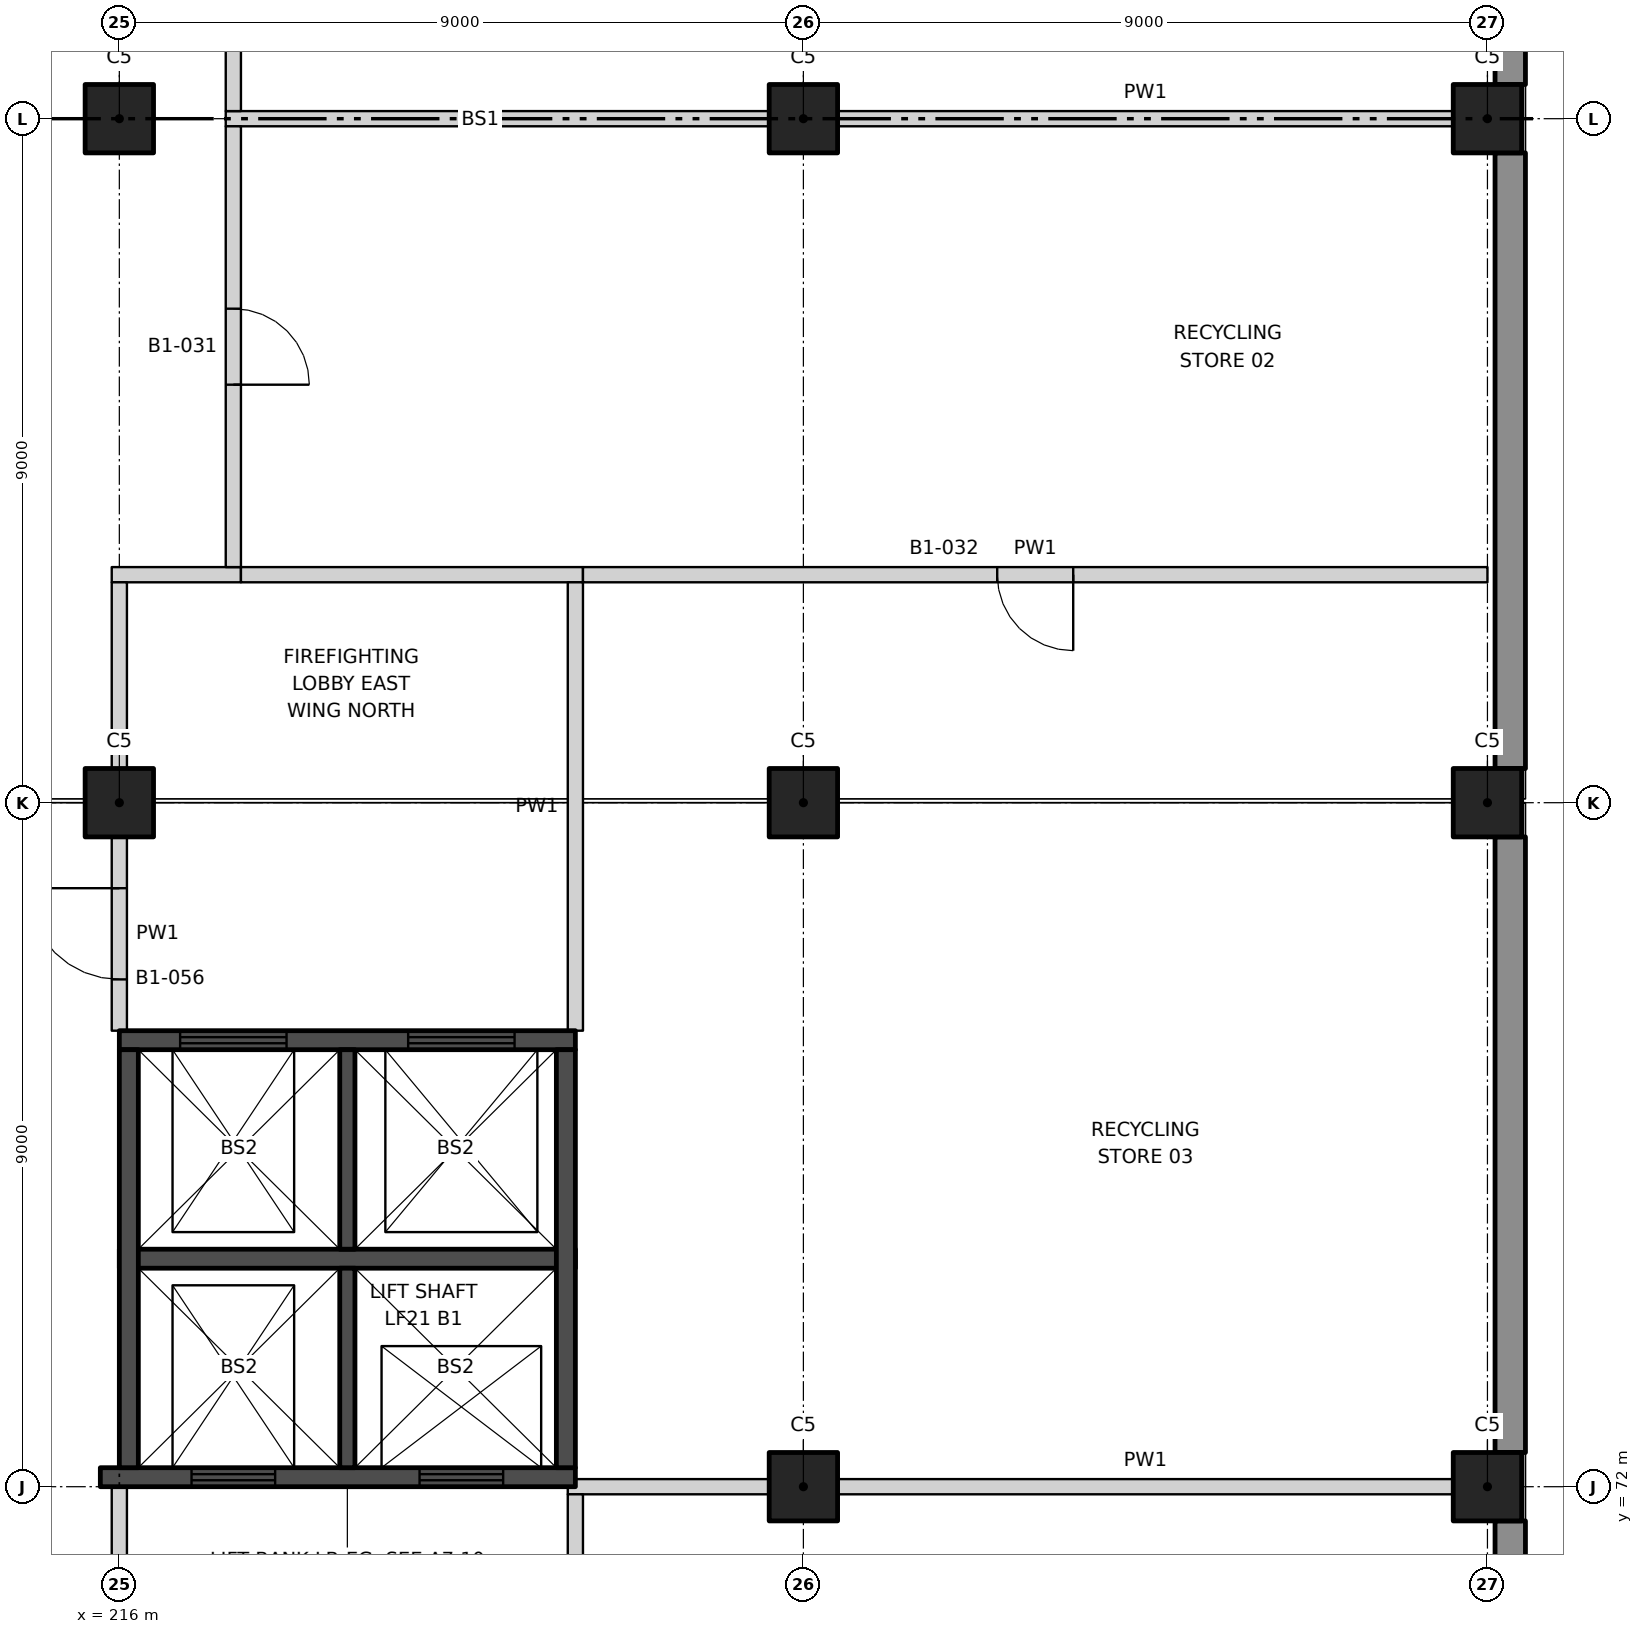
"""IFC4 building model, lengths in metres.
Left out: names, types, materials, properties, quantities, classifications, styles, units other than length and angle.
Written with IfcOpenShell. Run it as: python <this file> out.ifc"""

import sys

from ifc_helpers import new_model, si_unit, direction, frame, frame_2d, origin, origin_2d, place, context, subcontext, project, spatial, rectangle, extrude, element, fill, save


model = new_model("IFC4")
c1 = context("Model", 3, precision=1e-05, world=origin(), true_north=direction((0.0, 1.0)))
c2 = subcontext(c1, "Body", "Model", "MODEL_VIEW")
j1 = project(units=[si_unit("LENGTHUNIT", "METRE"), si_unit("PLANEANGLEUNIT", "RADIAN")], contexts=[c1])
p1 = place(None, origin())
s1 = spatial("IfcSite", under=j1, at=p1, CompositionType="ELEMENT")
p2 = place(p1, origin())
s2 = spatial("IfcBuilding", under=s1, at=p2, CompositionType="ELEMENT")
p3 = place(p2, frame((0.0, 0.0, -6.0)))
s3 = spatial("IfcBuildingStorey", under=s2, at=p3, CompositionType="ELEMENT", Elevation=-6.0)
for number, where, z_axis, x_axis in (
    (1, (216.0, 81.0, 0.0), (0.0, 0.0, 1.0), (1.0, 0.0, 0.0)),
    (2, (216.0, 90.0, 0.0), (0.0, 0.0, 1.0), (1.0, 0.0, 0.0)),
    (3, (225.0, 72.0, 0.0), (0.0, 0.0, 1.0), (1.0, 0.0, 0.0)),
    (4, (225.0, 81.0, 0.0), (0.0, 0.0, 1.0), (1.0, 0.0, 0.0)),
    (5, (225.0, 90.0, 0.0), (0.0, 0.0, 1.0), (1.0, 0.0, 0.0)),
    (6, (234.0, 72.0, 0.0), (0.0, 0.0, 1.0), (1.0, 0.0, 0.0)),
    (7, (234.0, 81.0, 0.0), (0.0, 0.0, 1.0), (1.0, 0.0, 0.0)),
    (8, (234.0, 90.0, 0.0), (0.0, 0.0, 1.0), (1.0, 0.0, 0.0)),
):
    element("IfcColumn", number, at=place(p3, frame(where, z_axis=z_axis, x_axis=x_axis)), inside=s3, PredefinedType="COLUMN", context=c2, shape_type="SweptSolid", body=[
        extrude(rectangle(XDim=0.9, YDim=0.9, at=origin_2d()), origin(), (0.0, 0.0, 1.0), 6.0),
    ])
p4 = place(p3, frame((225.45, 72.0, 0.0), z_axis=(0.0, 0.0, 1.0), x_axis=(1.0, 0.0, 0.0)))
e9 = element("IfcWall", 9, at=p4, inside=s3, PredefinedType="PARTITIONING", context=c2, shape_type="SweptSolid", body=[
    extrude(rectangle(XDim=8.1, YDim=0.2, at=frame_2d((4.05, 0.0))), origin(), (0.0, 0.0, 1.0), 4.65),
])
p5 = place(p3, frame((221.9, 72.0, 0.0), z_axis=(0.0, 0.0, 1.0), x_axis=(1.0, 0.0, 0.0)))
e10 = element("IfcWall", 10, at=p5, inside=s3, PredefinedType="PARTITIONING", context=c2, shape_type="SweptSolid", body=[
    extrude(rectangle(XDim=2.65, YDim=0.2, at=frame_2d((1.325, 0.0))), origin(), (0.0, 0.0, 1.0), 4.85),
])
p6 = place(p3, frame((215.9, 84.0, 0.0), z_axis=(0.0, 0.0, 1.0), x_axis=(1.0, 0.0, 0.0)))
e11 = element("IfcWall", 11, at=p6, inside=s3, PredefinedType="PARTITIONING", context=c2, shape_type="SweptSolid", body=[
    extrude(rectangle(XDim=1.7, YDim=0.2, at=frame_2d((0.85, 0.0))), origin(), (0.0, 0.0, 1.0), 6.0),
])
p7 = place(p3, frame((217.6, 84.0, 0.0), z_axis=(0.0, 0.0, 1.0), x_axis=(1.0, 0.0, 0.0)))
e12 = element("IfcWall", 12, at=p7, inside=s3, PredefinedType="PARTITIONING", context=c2, shape_type="SweptSolid", body=[
    extrude(rectangle(XDim=4.5, YDim=0.2, at=frame_2d((2.25, 0.0))), origin(), (0.0, 0.0, 1.0), 6.0),
])
p8 = place(p3, frame((222.1, 84.0, 0.0), z_axis=(0.0, 0.0, 1.0), x_axis=(1.0, 0.0, 0.0)))
e13 = element("IfcWall", 13, at=p8, inside=s3, PredefinedType="PARTITIONING", context=c2, shape_type="SweptSolid", body=[
    extrude(rectangle(XDim=11.9, YDim=0.2, at=frame_2d((5.95, 0.0))), origin(), (0.0, 0.0, 1.0), 6.0),
])
p9 = place(p8, frame((5.45, 0.0, 0.0)))
e14 = element("IfcOpeningElement", 14, at=p9, cuts=e13, PredefinedType="OPENING", context=c2, shape_type="SweptSolid", body=[
    extrude(rectangle(XDim=1.0, YDim=2.1, at=frame_2d((0.5, 1.05))), frame((0.0, 0.11, 0.0), z_axis=(0.0, -1.0, 0.0), x_axis=(1.0, 0.0, 0.0)), (0.0, 0.0, 1.0), 0.22),
])
p10 = place(p3, frame((225.45, 90.0, 0.0), z_axis=(0.0, 0.0, 1.0), x_axis=(1.0, 0.0, 0.0)))
e15 = element("IfcWall", 15, at=p10, inside=s3, PredefinedType="PARTITIONING", context=c2, shape_type="SweptSolid", body=[
    extrude(rectangle(XDim=8.1, YDim=0.2, at=frame_2d((4.05, 0.0))), origin(), (0.0, 0.0, 1.0), 4.65),
])
p11 = place(p3, frame((217.4, 90.0, 0.0), z_axis=(0.0, 0.0, 1.0), x_axis=(1.0, 0.0, 0.0)))
e16 = element("IfcWall", 16, at=p11, inside=s3, PredefinedType="PARTITIONING", context=c2, shape_type="SweptSolid", body=[
    extrude(rectangle(XDim=7.15, YDim=0.2, at=frame_2d((3.575, 0.0))), origin(), (0.0, 0.0, 1.0), 4.65),
])
p12 = place(p3, frame((216.0, 66.1, 0.0), z_axis=(0.0, 0.0, 1.0), x_axis=(0.0, 1.0, 0.0)))
e17 = element("IfcWall", 17, at=p12, inside=s3, PredefinedType="PARTITIONING", context=c2, shape_type="SweptSolid", body=[
    extrude(rectangle(XDim=5.9, YDim=0.2, at=frame_2d((2.95, 0.0))), origin(), (0.0, 0.0, 1.0), 4.55),
])
p13 = place(p12, frame((2.35, 0.0, 0.0)))
e18 = element("IfcOpeningElement", 18, at=p13, cuts=e17, PredefinedType="OPENING", context=c2, shape_type="SweptSolid", body=[
    extrude(rectangle(XDim=1.2, YDim=2.1, at=frame_2d((0.6, 1.05))), frame((0.0, 0.11, 0.0), z_axis=(0.0, -1.0, 0.0), x_axis=(1.0, 0.0, 0.0)), (0.0, 0.0, 1.0), 0.22),
])
p14 = place(p3, frame((216.0, 78.0, 0.0), z_axis=(0.0, 0.0, 1.0), x_axis=(0.0, 1.0, 0.0)))
e19 = element("IfcWall", 19, at=p14, inside=s3, PredefinedType="PARTITIONING", context=c2, shape_type="SweptSolid", body=[
    extrude(rectangle(XDim=2.55, YDim=0.2, at=frame_2d((1.275, 0.0))), origin(), (0.0, 0.0, 1.0), 4.85),
])
p15 = place(p14, frame((0.675, 0.0, 0.0)))
e20 = element("IfcOpeningElement", 20, at=p15, cuts=e19, PredefinedType="OPENING", context=c2, shape_type="SweptSolid", body=[
    extrude(rectangle(XDim=1.2, YDim=2.1, at=frame_2d((0.6, 1.05))), frame((0.0, 0.11, 0.0), z_axis=(0.0, -1.0, 0.0), x_axis=(1.0, 0.0, 0.0)), (0.0, 0.0, 1.0), 0.22),
])
p16 = place(p3, frame((216.0, 81.45, 0.0), z_axis=(0.0, 0.0, 1.0), x_axis=(0.0, 1.0, 0.0)))
e21 = element("IfcWall", 21, at=p16, inside=s3, PredefinedType="PARTITIONING", context=c2, shape_type="SweptSolid", body=[
    extrude(rectangle(XDim=2.45, YDim=0.2, at=frame_2d((1.225, 0.0))), origin(), (0.0, 0.0, 1.0), 4.65),
])
p17 = place(p3, frame((217.5, 84.1, 0.0), z_axis=(0.0, 0.0, 1.0), x_axis=(0.0, 1.0, 0.0)))
e22 = element("IfcWall", 22, at=p17, inside=s3, PredefinedType="PARTITIONING", context=c2, shape_type="SweptSolid", body=[
    extrude(rectangle(XDim=5.8, YDim=0.2, at=frame_2d((2.9, 0.0))), origin(), (0.0, 0.0, 1.0), 6.0),
])
p18 = place(p17, frame((2.4, 0.0, 0.0)))
e23 = element("IfcOpeningElement", 23, at=p18, cuts=e22, PredefinedType="OPENING", context=c2, shape_type="SweptSolid", body=[
    extrude(rectangle(XDim=1.0, YDim=2.1, at=frame_2d((0.5, 1.05))), frame((0.0, 0.11, 0.0), z_axis=(0.0, -1.0, 0.0), x_axis=(1.0, 0.0, 0.0)), (0.0, 0.0, 1.0), 0.22),
])
p19 = place(p3, frame((217.5, 90.1, 0.0), z_axis=(0.0, 0.0, 1.0), x_axis=(0.0, 1.0, 0.0)))
e24 = element("IfcWall", 24, at=p19, inside=s3, PredefinedType="PARTITIONING", context=c2, shape_type="SweptSolid", body=[
    extrude(rectangle(XDim=17.8, YDim=0.2, at=frame_2d((8.9, 0.0))), origin(), (0.0, 0.0, 1.0), 6.0),
])
p20 = place(p19, frame((3.5, 0.0, 0.0)))
e25 = element("IfcOpeningElement", 25, at=p20, cuts=e24, PredefinedType="OPENING", context=c2, shape_type="SweptSolid", body=[
    extrude(rectangle(XDim=1.8, YDim=2.1, at=frame_2d((0.9, 1.05))), frame((0.0, 0.11, 0.0), z_axis=(0.0, -1.0, 0.0), x_axis=(1.0, 0.0, 0.0)), (0.0, 0.0, 1.0), 0.22),
])
p21 = place(p19, frame((15.548, 0.0, 0.0)))
e26 = element("IfcOpeningElement", 26, at=p21, cuts=e24, PredefinedType="OPENING", context=c2, shape_type="SweptSolid", body=[
    extrude(rectangle(XDim=1.8, YDim=2.1, at=frame_2d((0.9, 1.05))), frame((0.0, 0.11, 0.0), z_axis=(0.0, -1.0, 0.0), x_axis=(1.0, 0.0, 0.0)), (0.0, 0.0, 1.0), 0.22),
])
p22 = place(p3, frame((222.0, 66.1, 0.0), z_axis=(0.0, 0.0, 1.0), x_axis=(0.0, 1.0, 0.0)))
e27 = element("IfcWall", 27, at=p22, inside=s3, PredefinedType="PARTITIONING", context=c2, shape_type="SweptSolid", body=[
    extrude(rectangle(XDim=5.8, YDim=0.2, at=frame_2d((2.9, 0.0))), origin(), (0.0, 0.0, 1.0), 6.0),
])
p23 = place(p3, frame((222.0, 78.0, 0.0), z_axis=(0.0, 0.0, 1.0), x_axis=(0.0, 1.0, 0.0)))
e28 = element("IfcWall", 28, at=p23, inside=s3, PredefinedType="PARTITIONING", context=c2, shape_type="SweptSolid", body=[
    extrude(rectangle(XDim=5.9, YDim=0.2, at=frame_2d((2.95, 0.0))), origin(), (0.0, 0.0, 1.0), 6.0),
])
for number, where, z_axis, x_axis in (
    (29, (234.3, 63.45, 0.0), (0.0, 0.0, 1.0), (0.0, 1.0, 0.0)),
    (30, (234.3, 72.45, 0.0), (0.0, 0.0, 1.0), (0.0, 1.0, 0.0)),
    (31, (234.3, 81.45, 0.0), (0.0, 0.0, 1.0), (0.0, 1.0, 0.0)),
    (32, (234.3, 90.45, 0.0), (0.0, 0.0, 1.0), (0.0, 1.0, 0.0)),
):
    element("IfcWall", number, at=place(p3, frame(where, z_axis=z_axis, x_axis=x_axis)), inside=s3, PredefinedType="SOLIDWALL", context=c2, shape_type="SweptSolid", body=[
        extrude(rectangle(XDim=8.1, YDim=0.4, at=frame_2d((4.05, 0.0))), origin(), (0.0, 0.0, 1.0), 6.0),
    ])
p24 = place(p3, frame((215.75, 72.125, -1.0), z_axis=(0.0, 0.0, 1.0), x_axis=(1.0, 0.0, 0.0)))
e33 = element("IfcWall", 33, at=p24, inside=s3, PredefinedType="SHEAR", context=c2, shape_type="SweptSolid", body=[
    extrude(rectangle(XDim=6.25, YDim=0.25, at=frame_2d((3.125, 0.0))), origin(), (0.0, 0.0, 1.0), 7.0),
])
p25 = place(p24, frame((1.2, 0.0, 1.0)))
e34 = element("IfcOpeningElement", 34, at=p25, cuts=e33, PredefinedType="OPENING", context=c2, shape_type="SweptSolid", body=[
    extrude(rectangle(XDim=1.1, YDim=2.1, at=frame_2d((0.55, 1.05))), frame((0.0, 0.135, 0.0), z_axis=(0.0, -1.0, 0.0), x_axis=(1.0, 0.0, 0.0)), (0.0, 0.0, 1.0), 0.27),
])
p26 = place(p24, frame((4.2, 0.0, 1.0)))
e35 = element("IfcOpeningElement", 35, at=p26, cuts=e33, PredefinedType="OPENING", context=c2, shape_type="SweptSolid", body=[
    extrude(rectangle(XDim=1.1, YDim=2.1, at=frame_2d((0.55, 1.05))), frame((0.0, 0.135, 0.0), z_axis=(0.0, -1.0, 0.0), x_axis=(1.0, 0.0, 0.0)), (0.0, 0.0, 1.0), 0.27),
])
p27 = place(p3, frame((216.0, 77.875, -1.0), z_axis=(0.0, 0.0, 1.0), x_axis=(1.0, 0.0, 0.0)))
e36 = element("IfcWall", 36, at=p27, inside=s3, PredefinedType="SHEAR", context=c2, shape_type="SweptSolid", body=[
    extrude(rectangle(XDim=6.0, YDim=0.25, at=frame_2d((3.0, 0.0))), origin(), (0.0, 0.0, 1.0), 7.0),
])
p28 = place(p27, frame((0.8, 0.0, 1.0)))
e37 = element("IfcOpeningElement", 37, at=p28, cuts=e36, PredefinedType="OPENING", context=c2, shape_type="SweptSolid", body=[
    extrude(rectangle(XDim=1.4, YDim=2.1, at=frame_2d((0.7, 1.05))), frame((0.0, 0.135, 0.0), z_axis=(0.0, -1.0, 0.0), x_axis=(1.0, 0.0, 0.0)), (0.0, 0.0, 1.0), 0.27),
])
p29 = place(p27, frame((3.8, 0.0, 1.0)))
e38 = element("IfcOpeningElement", 38, at=p29, cuts=e36, PredefinedType="OPENING", context=c2, shape_type="SweptSolid", body=[
    extrude(rectangle(XDim=1.4, YDim=2.1, at=frame_2d((0.7, 1.05))), frame((0.0, 0.135, 0.0), z_axis=(0.0, -1.0, 0.0), x_axis=(1.0, 0.0, 0.0)), (0.0, 0.0, 1.0), 0.27),
])
p30 = place(p3, frame((216.0, 75.0, -1.0), z_axis=(0.0, 0.0, 1.0), x_axis=(1.0, 0.0, 0.0)))
e39 = element("IfcWall", 39, at=p30, inside=s3, PredefinedType="SHEAR", context=c2, shape_type="SweptSolid", body=[
    extrude(rectangle(XDim=6.0, YDim=0.25, at=frame_2d((3.0, 0.0))), origin(), (0.0, 0.0, 1.0), 7.0),
])
for number, where, z_axis, x_axis in (
    (40, (216.125, 72.25, -1.0), (0.0, 0.0, 1.0), (0.0, 1.0, 0.0)),
    (41, (221.875, 72.25, -1.0), (0.0, 0.0, 1.0), (0.0, 1.0, 0.0)),
):
    element("IfcWall", number, at=place(p3, frame(where, z_axis=z_axis, x_axis=x_axis)), inside=s3, PredefinedType="SHEAR", context=c2, shape_type="SweptSolid", body=[
        extrude(rectangle(XDim=5.5, YDim=0.25, at=frame_2d((2.75, 0.0))), origin(), (0.0, 0.0, 1.0), 7.0),
    ])
for number, where, z_axis, x_axis in (
    (42, (219.0, 72.25, -1.0), (0.0, 0.0, 1.0), (0.0, 1.0, 0.0)),
    (43, (219.0, 75.125, -1.0), (0.0, 0.0, 1.0), (0.0, 1.0, 0.0)),
):
    element("IfcWall", number, at=place(p3, frame(where, z_axis=z_axis, x_axis=x_axis)), inside=s3, PredefinedType="SHEAR", context=c2, shape_type="SweptSolid", body=[
        extrude(rectangle(XDim=2.625, YDim=0.2, at=frame_2d((1.312, 0.0))), origin(), (0.0, 0.0, 1.0), 7.0),
    ])
p31 = place(p18, frame((1.0, 0.0, 0.0), z_axis=(0.0, 0.0, 1.0), x_axis=(-1.0, 0.0, 0.0)))
e44 = element("IfcDoor", 44, at=p31, inside=s3, OperationType="SINGLE_SWING_RIGHT", PredefinedType="DOOR", context=c2, shape_type="SweptSolid", body=[
    extrude(rectangle(XDim=1.0, YDim=2.1, at=frame_2d((0.5, 1.05))), frame((0.0, 0.025, 0.0), z_axis=(0.0, -1.0, 0.0), x_axis=(1.0, 0.0, 0.0)), (0.0, 0.0, 1.0), 0.05),
])
fill(e23, e44)
p32 = place(p9, frame((1.0, 0.0, 0.0), z_axis=(0.0, 0.0, 1.0), x_axis=(-1.0, 0.0, 0.0)))
e45 = element("IfcDoor", 45, at=p32, inside=s3, OperationType="SINGLE_SWING_LEFT", PredefinedType="DOOR", context=c2, shape_type="SweptSolid", body=[
    extrude(rectangle(XDim=1.0, YDim=2.1, at=frame_2d((0.5, 1.05))), frame((0.0, 0.025, 0.0), z_axis=(0.0, -1.0, 0.0), x_axis=(1.0, 0.0, 0.0)), (0.0, 0.0, 1.0), 0.05),
])
fill(e14, e45)
p33 = place(p15, origin())
e46 = element("IfcDoor", 46, at=p33, inside=s3, OperationType="SINGLE_SWING_RIGHT", PredefinedType="DOOR", context=c2, shape_type="SweptSolid", body=[
    extrude(rectangle(XDim=1.2, YDim=2.1, at=frame_2d((0.6, 1.05))), frame((0.0, 0.025, 0.0), z_axis=(0.0, -1.0, 0.0), x_axis=(1.0, 0.0, 0.0)), (0.0, 0.0, 1.0), 0.05),
])
fill(e20, e46)
p34 = place(p25, origin())
e47 = element("IfcDoor", 47, at=p34, inside=s3, OperationType="DOUBLE_DOOR_SLIDING", PredefinedType="DOOR", context=c2, shape_type="SweptSolid", body=[
    extrude(rectangle(XDim=1.1, YDim=2.1, at=frame_2d((0.55, 1.05))), frame((0.0, 0.025, 0.0), z_axis=(0.0, -1.0, 0.0), x_axis=(1.0, 0.0, 0.0)), (0.0, 0.0, 1.0), 0.05),
])
fill(e34, e47)
p35 = place(p26, origin())
e48 = element("IfcDoor", 48, at=p35, inside=s3, OperationType="DOUBLE_DOOR_SLIDING", PredefinedType="DOOR", context=c2, shape_type="SweptSolid", body=[
    extrude(rectangle(XDim=1.1, YDim=2.1, at=frame_2d((0.55, 1.05))), frame((0.0, 0.025, 0.0), z_axis=(0.0, -1.0, 0.0), x_axis=(1.0, 0.0, 0.0)), (0.0, 0.0, 1.0), 0.05),
])
fill(e35, e48)
p36 = place(p28, origin())
e49 = element("IfcDoor", 49, at=p36, inside=s3, OperationType="DOUBLE_DOOR_SLIDING", PredefinedType="DOOR", context=c2, shape_type="SweptSolid", body=[
    extrude(rectangle(XDim=1.4, YDim=2.1, at=frame_2d((0.7, 1.05))), frame((0.0, 0.025, 0.0), z_axis=(0.0, -1.0, 0.0), x_axis=(1.0, 0.0, 0.0)), (0.0, 0.0, 1.0), 0.05),
])
fill(e37, e49)
p37 = place(p29, origin())
e50 = element("IfcDoor", 50, at=p37, inside=s3, OperationType="DOUBLE_DOOR_SLIDING", PredefinedType="DOOR", context=c2, shape_type="SweptSolid", body=[
    extrude(rectangle(XDim=1.4, YDim=2.1, at=frame_2d((0.7, 1.05))), frame((0.0, 0.025, 0.0), z_axis=(0.0, -1.0, 0.0), x_axis=(1.0, 0.0, 0.0)), (0.0, 0.0, 1.0), 0.05),
])
fill(e38, e50)
save(model, sys.argv[1])
